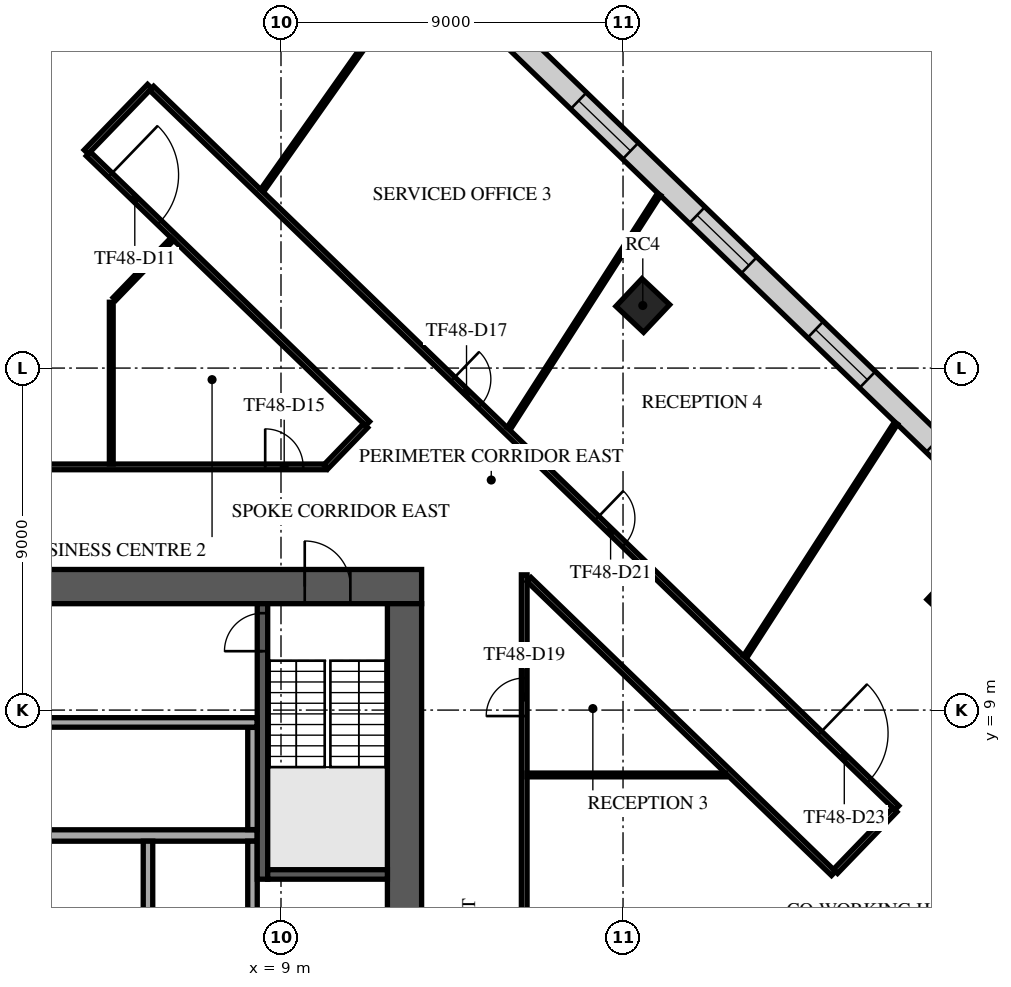
"""IFC4 building model, lengths in metres.
Left out: names, types, materials, properties, quantities, classifications, styles, units other than length and angle.
Written with IfcOpenShell. Run it as: python <this file> out.ifc"""

import sys

from ifc_helpers import new_model, si_unit, direction, frame, frame_2d, origin, origin_2d, place, context, subcontext, project, spatial, rectangle, extrude, element, fill, save


model = new_model("IFC4")
c1 = context("Model", 3, precision=1e-05, world=origin(), true_north=direction((0.0, 1.0)))
c2 = subcontext(c1, "Body", "Model", "MODEL_VIEW")
j1 = project(units=[si_unit("LENGTHUNIT", "METRE"), si_unit("PLANEANGLEUNIT", "RADIAN")], contexts=[c1])
p1 = place(None, origin())
s1 = spatial("IfcSite", under=j1, at=p1, CompositionType="ELEMENT")
p2 = place(p1, origin())
s2 = spatial("IfcBuilding", under=s1, at=p2, CompositionType="ELEMENT")
p3 = place(p2, frame((0.0, 0.0, 205.3)))
s3 = spatial("IfcBuildingStorey", under=s2, at=p3, CompositionType="ELEMENT", Elevation=205.3)
for number, where, z_axis, x_axis in (
    (1, (26.706, 11.931, 0.0), (0.0, 0.0, 1.0), (0.686, 0.728, 0.0)),
    (2, (18.52, 19.647, 0.0), (0.0, 0.0, 1.0), (0.686, 0.728, 0.0)),
):
    element("IfcColumn", number, at=place(p3, frame(where, z_axis=z_axis, x_axis=x_axis)), inside=s3, PredefinedType="COLUMN", context=c2, shape_type="SweptSolid", body=[
        extrude(rectangle(XDim=1.0, YDim=1.0, at=origin_2d()), origin(), (0.0, 0.0, 1.0), 4.0),
    ])
p4 = place(p3, frame((-12.7, 12.25, 0.0), z_axis=(0.0, 0.0, 1.0), x_axis=(1.0, 0.0, 0.0)))
e3 = element("IfcWall", 3, at=p4, inside=s3, PredefinedType="SHEAR", context=c2, shape_type="SweptSolid", body=[
    extrude(rectangle(XDim=25.4, YDim=0.9, at=frame_2d((12.7, 0.0))), origin(), (0.0, 0.0, 1.0), 3.62),
])
p5 = place(p4, frame((11.5, 0.0, 0.0)))
e4 = element("IfcOpeningElement", 4, at=p5, cuts=e3, PredefinedType="OPENING", context=c2, shape_type="SweptSolid", body=[
    extrude(rectangle(XDim=2.4, YDim=2.4, at=frame_2d((1.2, 1.2))), frame((0.0, 0.46, 0.0), z_axis=(0.0, -1.0, 0.0), x_axis=(1.0, 0.0, 0.0)), (0.0, 0.0, 1.0), 0.92),
])
p6 = place(p4, frame((22.325, 0.0, 0.0)))
e5 = element("IfcOpeningElement", 5, at=p6, cuts=e3, PredefinedType="OPENING", context=c2, shape_type="SweptSolid", body=[
    extrude(rectangle(XDim=1.2, YDim=2.1, at=frame_2d((0.6, 1.05))), frame((0.0, 0.46, 0.0), z_axis=(0.0, -1.0, 0.0), x_axis=(1.0, 0.0, 0.0)), (0.0, 0.0, 1.0), 0.92),
])
p7 = place(p4, frame((1.3, 0.0, 0.0)))
e6 = element("IfcOpeningElement", 6, at=p7, cuts=e3, PredefinedType="OPENING", context=c2, shape_type="SweptSolid", body=[
    extrude(rectangle(XDim=1.0, YDim=2.1, at=frame_2d((0.5, 1.05))), frame((0.0, 0.46, 0.0), z_axis=(0.0, -1.0, 0.0), x_axis=(1.0, 0.0, 0.0)), (0.0, 0.0, 1.0), 0.92),
])
p8 = place(p3, frame((12.25, -11.8, 0.0), z_axis=(0.0, 0.0, 1.0), x_axis=(0.0, 1.0, 0.0)))
e7 = element("IfcWall", 7, at=p8, inside=s3, PredefinedType="SHEAR", context=c2, shape_type="SweptSolid", body=[
    extrude(rectangle(XDim=23.6, YDim=0.9, at=frame_2d((11.8, 0.0))), origin(), (0.0, 0.0, 1.0), 3.62),
])
p9 = place(p8, frame((10.6, 0.0, 0.0)))
e8 = element("IfcOpeningElement", 8, at=p9, cuts=e7, PredefinedType="OPENING", context=c2, shape_type="SweptSolid", body=[
    extrude(rectangle(XDim=2.4, YDim=2.4, at=frame_2d((1.2, 1.2))), frame((0.0, 0.46, 0.0), z_axis=(0.0, -1.0, 0.0), x_axis=(1.0, 0.0, 0.0)), (0.0, 0.0, 1.0), 0.92),
])
p10 = place(p3, frame((-8.375, 5.7, 0.0), z_axis=(0.0, 0.0, 1.0), x_axis=(1.0, 0.0, 0.0)))
e9 = element("IfcWall", 9, at=p10, inside=s3, PredefinedType="SOLIDWALL", context=c2, shape_type="SweptSolid", body=[
    extrude(rectangle(XDim=16.75, YDim=0.3, at=frame_2d((8.375, 0.0))), origin(), (0.0, 0.0, 1.0), 3.62),
])
for number, where, z_axis, x_axis in (
    (10, (5.5, 2.85, 0.0), (0.0, 0.0, 1.0), (0.0, 1.0, 0.0)),
    (11, (8.25, 2.85, 0.0), (0.0, 0.0, 1.0), (0.0, 1.0, 0.0)),
):
    element("IfcWall", number, at=place(p3, frame(where, z_axis=z_axis, x_axis=x_axis)), inside=s3, PredefinedType="SOLIDWALL", context=c2, shape_type="SweptSolid", body=[
        extrude(rectangle(XDim=2.7, YDim=0.25, at=frame_2d((1.35, 0.0))), origin(), (0.0, 0.0, 1.0), 3.62),
    ])
p11 = place(p3, frame((8.512, 4.55, 0.0), z_axis=(0.0, 0.0, 1.0), x_axis=(0.0, 1.0, 0.0)))
e12 = element("IfcWall", 12, at=p11, inside=s3, PredefinedType="SOLIDWALL", context=c2, shape_type="SweptSolid", body=[
    extrude(rectangle(XDim=7.25, YDim=0.275, at=frame_2d((3.625, 0.0))), origin(), (0.0, 0.0, 1.0), 3.62),
])
p12 = place(p11, frame((6.0, 0.0, 0.0)))
e13 = element("IfcOpeningElement", 13, at=p12, cuts=e12, PredefinedType="OPENING", context=c2, shape_type="SweptSolid", body=[
    extrude(rectangle(XDim=1.0, YDim=2.1, at=frame_2d((0.5, 1.05))), frame((0.0, 0.147, 0.0), z_axis=(0.0, -1.0, 0.0), x_axis=(1.0, 0.0, 0.0)), (0.0, 0.0, 1.0), 0.295),
])
p13 = place(p3, frame((8.65, 4.675, 0.0), z_axis=(0.0, 0.0, 1.0), x_axis=(1.0, 0.0, 0.0)))
e14 = element("IfcWall", 14, at=p13, inside=s3, PredefinedType="SOLIDWALL", context=c2, shape_type="SweptSolid", body=[
    extrude(rectangle(XDim=3.15, YDim=0.25, at=frame_2d((1.575, 0.0))), origin(), (0.0, 0.0, 1.0), 3.62),
])
p14 = place(p3, frame((8.25, 5.855, 0.0), z_axis=(0.0, 0.0, 1.0), x_axis=(0.0, 1.0, 0.0)))
e15 = element("IfcWall", 15, at=p14, inside=s3, PredefinedType="PARTITIONING", context=c2, shape_type="SweptSolid", body=[
    extrude(rectangle(XDim=2.69, YDim=0.25, at=frame_2d((1.345, 0.0))), origin(), (0.0, 0.0, 1.0), 3.62),
])
p15 = place(p3, frame((-8.35, 8.675, 0.0), z_axis=(0.0, 0.0, 1.0), x_axis=(1.0, 0.0, 0.0)))
e16 = element("IfcWall", 16, at=p15, inside=s3, PredefinedType="PARTITIONING", context=c2, shape_type="SweptSolid", body=[
    extrude(rectangle(XDim=16.72, YDim=0.25, at=frame_2d((8.36, 0.0))), origin(), (0.0, 0.0, 1.0), 3.62),
])
p16 = place(p15, frame((0.975, 0.0, 0.0)))
e17 = element("IfcOpeningElement", 17, at=p16, cuts=e16, PredefinedType="OPENING", context=c2, shape_type="SweptSolid", body=[
    extrude(rectangle(XDim=1.0, YDim=2.1, at=frame_2d((0.5, 1.05))), frame((0.0, 0.135, 0.0), z_axis=(0.0, -1.0, 0.0), x_axis=(1.0, 0.0, 0.0)), (0.0, 0.0, 1.0), 0.27),
])
p17 = place(p15, frame((3.725, 0.0, 0.0)))
e18 = element("IfcOpeningElement", 18, at=p17, cuts=e16, PredefinedType="OPENING", context=c2, shape_type="SweptSolid", body=[
    extrude(rectangle(XDim=1.0, YDim=2.1, at=frame_2d((0.5, 1.05))), frame((0.0, 0.135, 0.0), z_axis=(0.0, -1.0, 0.0), x_axis=(1.0, 0.0, 0.0)), (0.0, 0.0, 1.0), 0.27),
])
p18 = place(p15, frame((9.125, 0.0, 0.0)))
e19 = element("IfcOpeningElement", 19, at=p18, cuts=e16, PredefinedType="OPENING", context=c2, shape_type="SweptSolid", body=[
    extrude(rectangle(XDim=1.2, YDim=2.1, at=frame_2d((0.6, 1.05))), frame((0.0, 0.135, 0.0), z_axis=(0.0, -1.0, 0.0), x_axis=(1.0, 0.0, 0.0)), (0.0, 0.0, 1.0), 0.27),
])
p19 = place(p3, frame((34.658, 7.819, 0.0), z_axis=(0.0, 0.0, 1.0), x_axis=(-0.719340729741, 0.694657408034, 0.0)))
e20 = element("IfcWall", 20, at=p19, inside=s3, PredefinedType="STANDARD", context=c2, shape_type="SweptSolid", body=[
    extrude(rectangle(XDim=39.0, YDim=0.6, at=frame_2d((19.5, 0.0))), origin(), (0.0, 0.0, 1.0), 3.62),
])
p20 = place(p19, frame((1.217, 0.0, 0.9)))
e21 = element("IfcOpeningElement", 21, at=p20, cuts=e20, PredefinedType="OPENING", context=c2, shape_type="SweptSolid", body=[
    extrude(rectangle(XDim=1.9, YDim=2.1, at=frame_2d((0.95, 1.05))), frame((0.0, 0.31, 0.0), z_axis=(0.0, -1.0, 0.0), x_axis=(1.0, 0.0, 0.0)), (0.0, 0.0, 1.0), 0.62),
])
p21 = place(p19, frame((5.55, 0.0, 0.9)))
e22 = element("IfcOpeningElement", 22, at=p21, cuts=e20, PredefinedType="OPENING", context=c2, shape_type="SweptSolid", body=[
    extrude(rectangle(XDim=1.9, YDim=2.1, at=frame_2d((0.95, 1.05))), frame((0.0, 0.31, 0.0), z_axis=(0.0, -1.0, 0.0), x_axis=(1.0, 0.0, 0.0)), (0.0, 0.0, 1.0), 0.62),
])
p22 = place(p19, frame((9.883, 0.0, 0.9)))
e23 = element("IfcOpeningElement", 23, at=p22, cuts=e20, PredefinedType="OPENING", context=c2, shape_type="SweptSolid", body=[
    extrude(rectangle(XDim=1.9, YDim=2.1, at=frame_2d((0.95, 1.05))), frame((0.0, 0.31, 0.0), z_axis=(0.0, -1.0, 0.0), x_axis=(1.0, 0.0, 0.0)), (0.0, 0.0, 1.0), 0.62),
])
p23 = place(p19, frame((14.217, 0.0, 0.9)))
e24 = element("IfcOpeningElement", 24, at=p23, cuts=e20, PredefinedType="OPENING", context=c2, shape_type="SweptSolid", body=[
    extrude(rectangle(XDim=1.9, YDim=2.1, at=frame_2d((0.95, 1.05))), frame((0.0, 0.31, 0.0), z_axis=(0.0, -1.0, 0.0), x_axis=(1.0, 0.0, 0.0)), (0.0, 0.0, 1.0), 0.62),
])
p24 = place(p19, frame((18.55, 0.0, 0.9)))
e25 = element("IfcOpeningElement", 25, at=p24, cuts=e20, PredefinedType="OPENING", context=c2, shape_type="SweptSolid", body=[
    extrude(rectangle(XDim=1.9, YDim=2.1, at=frame_2d((0.95, 1.05))), frame((0.0, 0.31, 0.0), z_axis=(0.0, -1.0, 0.0), x_axis=(1.0, 0.0, 0.0)), (0.0, 0.0, 1.0), 0.62),
])
p25 = place(p19, frame((22.883, 0.0, 0.9)))
e26 = element("IfcOpeningElement", 26, at=p25, cuts=e20, PredefinedType="OPENING", context=c2, shape_type="SweptSolid", body=[
    extrude(rectangle(XDim=1.9, YDim=2.1, at=frame_2d((0.95, 1.05))), frame((0.0, 0.31, 0.0), z_axis=(0.0, -1.0, 0.0), x_axis=(1.0, 0.0, 0.0)), (0.0, 0.0, 1.0), 0.62),
])
p26 = place(p19, frame((27.217, 0.0, 0.9)))
e27 = element("IfcOpeningElement", 27, at=p26, cuts=e20, PredefinedType="OPENING", context=c2, shape_type="SweptSolid", body=[
    extrude(rectangle(XDim=1.9, YDim=2.1, at=frame_2d((0.95, 1.05))), frame((0.0, 0.31, 0.0), z_axis=(0.0, -1.0, 0.0), x_axis=(1.0, 0.0, 0.0)), (0.0, 0.0, 1.0), 0.62),
])
p27 = place(p19, frame((31.55, 0.0, 0.9)))
e28 = element("IfcOpeningElement", 28, at=p27, cuts=e20, PredefinedType="OPENING", context=c2, shape_type="SweptSolid", body=[
    extrude(rectangle(XDim=1.9, YDim=2.1, at=frame_2d((0.95, 1.05))), frame((0.0, 0.31, 0.0), z_axis=(0.0, -1.0, 0.0), x_axis=(1.0, 0.0, 0.0)), (0.0, 0.0, 1.0), 0.62),
])
p28 = place(p19, frame((35.883, 0.0, 0.9)))
e29 = element("IfcOpeningElement", 29, at=p28, cuts=e20, PredefinedType="OPENING", context=c2, shape_type="SweptSolid", body=[
    extrude(rectangle(XDim=1.9, YDim=2.1, at=frame_2d((0.95, 1.05))), frame((0.0, 0.31, 0.0), z_axis=(0.0, -1.0, 0.0), x_axis=(1.0, 0.0, 0.0)), (0.0, 0.0, 1.0), 0.62),
])
p29 = place(p3, frame((-8.737, 15.4, 0.0), z_axis=(0.0, 0.0, 1.0), x_axis=(1.0, 0.0, 0.0)))
e30 = element("IfcWall", 30, at=p29, inside=s3, PredefinedType="PARTITIONING", context=c2, shape_type="SweptSolid", body=[
    extrude(rectangle(XDim=18.916, YDim=0.15, at=frame_2d((9.458, 0.0))), origin(), (0.0, 0.0, 1.0), 3.17),
])
p30 = place(p29, frame((17.321, 0.0, 0.0)))
e31 = element("IfcOpeningElement", 31, at=p30, cuts=e30, PredefinedType="OPENING", context=c2, shape_type="SweptSolid", body=[
    extrude(rectangle(XDim=1.0, YDim=2.1, at=frame_2d((0.5, 1.05))), frame((0.0, 0.085, 0.0), z_axis=(0.0, -1.0, 0.0), x_axis=(1.0, 0.0, 0.0)), (0.0, 0.0, 1.0), 0.17),
])
p31 = place(p3, frame((3.876, 23.688, 0.0), z_axis=(0.0, 0.0, 1.0), x_axis=(0.694688923552, 0.719310294305, 0.0)))
e32 = element("IfcWall", 32, at=p31, inside=s3, PredefinedType="PARTITIONING", context=c2, shape_type="SweptSolid", body=[
    extrude(rectangle(XDim=2.4, YDim=0.15, at=frame_2d((1.2, 0.0))), origin(), (0.0, 0.0, 1.0), 3.17),
])
p32 = place(p3, frame((3.93, 23.636, 0.0), z_axis=(0.0, 0.0, 1.0), x_axis=(0.719341752701, -0.694656348723, 0.0)))
e33 = element("IfcWall", 33, at=p32, inside=s3, PredefinedType="PARTITIONING", context=c2, shape_type="SweptSolid", body=[
    extrude(rectangle(XDim=10.217, YDim=0.15, at=frame_2d((5.108, 0.0))), origin(), (0.0, 0.0, 1.0), 3.17),
])
p33 = place(p32, frame((0.8, 0.0, 0.0)))
e34 = element("IfcOpeningElement", 34, at=p33, cuts=e33, PredefinedType="OPENING", context=c2, shape_type="SweptSolid", body=[
    extrude(rectangle(XDim=1.8, YDim=2.1, at=frame_2d((0.9, 1.05))), frame((0.0, 0.085, 0.0), z_axis=(0.0, -1.0, 0.0), x_axis=(1.0, 0.0, 0.0)), (0.0, 0.0, 1.0), 0.17),
])
p34 = place(p3, frame((5.597, 25.362, 0.0), z_axis=(0.0, 0.0, 1.0), x_axis=(0.719350067003, -0.69464773886, 0.0)))
e35 = element("IfcWall", 35, at=p34, inside=s3, PredefinedType="PARTITIONING", context=c2, shape_type="SweptSolid", body=[
    extrude(rectangle(XDim=27.258, YDim=0.15, at=frame_2d((13.629, 0.0))), origin(), (0.0, 0.0, 1.0), 3.17),
])
p35 = place(p34, frame((11.017, 0.0, 0.0)))
e36 = element("IfcOpeningElement", 36, at=p35, cuts=e35, PredefinedType="OPENING", context=c2, shape_type="SweptSolid", body=[
    extrude(rectangle(XDim=1.0, YDim=2.1, at=frame_2d((0.5, 1.05))), frame((0.0, 0.085, 0.0), z_axis=(0.0, -1.0, 0.0), x_axis=(1.0, 0.0, 0.0)), (0.0, 0.0, 1.0), 0.17),
])
p36 = place(p34, frame((16.287, 0.0, 0.0)))
e37 = element("IfcOpeningElement", 37, at=p36, cuts=e35, PredefinedType="OPENING", context=c2, shape_type="SweptSolid", body=[
    extrude(rectangle(XDim=1.0, YDim=2.1, at=frame_2d((0.5, 1.05))), frame((0.0, 0.085, 0.0), z_axis=(0.0, -1.0, 0.0), x_axis=(1.0, 0.0, 0.0)), (0.0, 0.0, 1.0), 0.17),
])
p37 = place(p34, frame((24.435, 0.0, 0.0)))
e38 = element("IfcOpeningElement", 38, at=p37, cuts=e35, PredefinedType="OPENING", context=c2, shape_type="SweptSolid", body=[
    extrude(rectangle(XDim=1.8, YDim=2.1, at=frame_2d((0.9, 1.05))), frame((0.0, 0.085, 0.0), z_axis=(0.0, -1.0, 0.0), x_axis=(1.0, 0.0, 0.0)), (0.0, 0.0, 1.0), 0.17),
])
p38 = place(p3, frame((10.18, 15.4, 0.0), z_axis=(0.0, 0.0, 1.0), x_axis=(0.694282379976, 0.719702700325, 0.0)))
e39 = element("IfcWall", 39, at=p38, inside=s3, PredefinedType="PARTITIONING", context=c2, shape_type="SweptSolid", body=[
    extrude(rectangle(XDim=1.508, YDim=0.15, at=frame_2d((0.754, 0.0))), origin(), (0.0, 0.0, 1.0), 3.17),
])
p39 = place(p3, frame((15.4, -8.314, 0.0), z_axis=(0.0, 0.0, 1.0), x_axis=(0.0, 1.0, 0.0)))
e40 = element("IfcWall", 40, at=p39, inside=s3, PredefinedType="PARTITIONING", context=c2, shape_type="SweptSolid", body=[
    extrude(rectangle(XDim=20.874, YDim=0.15, at=frame_2d((10.437, 0.0))), origin(), (0.0, 0.0, 1.0), 3.17),
])
p40 = place(p39, frame((17.158, 0.0, 0.0)))
e41 = element("IfcOpeningElement", 41, at=p40, cuts=e40, PredefinedType="OPENING", context=c2, shape_type="SweptSolid", body=[
    extrude(rectangle(XDim=1.0, YDim=2.1, at=frame_2d((0.5, 1.05))), frame((0.0, 0.085, 0.0), z_axis=(0.0, -1.0, 0.0), x_axis=(1.0, 0.0, 0.0)), (0.0, 0.0, 1.0), 0.17),
])
p41 = place(p3, frame((15.527, 12.436, 0.0), z_axis=(0.0, 0.0, 1.0), x_axis=(0.719374261493, -0.694622683118, 0.0)))
e42 = element("IfcWall", 42, at=p41, inside=s3, PredefinedType="PARTITIONING", context=c2, shape_type="SweptSolid", body=[
    extrude(rectangle(XDim=11.136, YDim=0.15, at=frame_2d((5.568, 0.0))), origin(), (0.0, 0.0, 1.0), 3.17),
])
p42 = place(p3, frame((23.59, 4.755, 0.0), z_axis=(0.0, 0.0, 1.0), x_axis=(0.694681664174, 0.719317305131, 0.0)))
e43 = element("IfcWall", 43, at=p42, inside=s3, PredefinedType="PARTITIONING", context=c2, shape_type="SweptSolid", body=[
    extrude(rectangle(XDim=2.25, YDim=0.15, at=frame_2d((1.125, 0.0))), origin(), (0.0, 0.0, 1.0), 3.62),
])
p43 = place(p3, frame((4.534, 15.475, 0.0), z_axis=(0.0, 0.0, 1.0), x_axis=(0.0, 1.0, 0.0)))
e44 = element("IfcWall", 44, at=p43, inside=s3, PredefinedType="PARTITIONING", context=c2, shape_type="SweptSolid", body=[
    extrude(rectangle(XDim=4.257, YDim=0.1, at=frame_2d((2.128, 0.0))), origin(), (0.0, 0.0, 1.0), 3.62),
])
p44 = place(p3, frame((4.62, 19.821, 0.0), z_axis=(0.0, 0.0, 1.0), x_axis=(0.694620384486, 0.719376481028, 0.0)))
e45 = element("IfcWall", 45, at=p44, inside=s3, PredefinedType="PARTITIONING", context=c2, shape_type="SweptSolid", body=[
    extrude(rectangle(XDim=2.189, YDim=0.1, at=frame_2d((1.095, 0.0))), origin(), (0.0, 0.0, 1.0), 3.17),
])
p45 = place(p3, frame((8.503, 22.67, 0.0), z_axis=(0.0, 0.0, 1.0), x_axis=(0.576640998349, 0.816997649338, 0.0)))
e46 = element("IfcWall", 46, at=p45, inside=s3, PredefinedType="PARTITIONING", context=c2, shape_type="SweptSolid", body=[
    extrude(rectangle(XDim=7.269, YDim=0.1, at=frame_2d((3.634, 0.0))), origin(), (0.0, 0.0, 1.0), 2.97),
])
p46 = place(p3, frame((14.992, 16.408, 0.0), z_axis=(0.0, 0.0, 1.0), x_axis=(0.54025368273, 0.841502203382, 0.0)))
e47 = element("IfcWall", 47, at=p46, inside=s3, PredefinedType="PARTITIONING", context=c2, shape_type="SweptSolid", body=[
    extrude(rectangle(XDim=7.323, YDim=0.1, at=frame_2d((3.662, 0.0))), origin(), (0.0, 0.0, 1.0), 2.97),
])
p47 = place(p3, frame((15.475, 7.293, 0.0), z_axis=(0.0, 0.0, 1.0), x_axis=(1.0, 0.0, 0.0)))
e48 = element("IfcWall", 48, at=p47, inside=s3, PredefinedType="PARTITIONING", context=c2, shape_type="SweptSolid", body=[
    extrude(rectangle(XDim=5.218, YDim=0.1, at=frame_2d((2.609, 0.0))), origin(), (0.0, 0.0, 1.0), 3.17),
])
p48 = place(p3, frame((21.213, 10.4, 0.0), z_axis=(0.0, 0.0, 1.0), x_axis=(0.542191446755, 0.840254982172, 0.0)))
e49 = element("IfcWall", 49, at=p48, inside=s3, PredefinedType="PARTITIONING", context=c2, shape_type="SweptSolid", body=[
    extrude(rectangle(XDim=7.319, YDim=0.1, at=frame_2d((3.66, 0.0))), origin(), (0.0, 0.0, 1.0), 2.97),
])
p49 = place(p6, origin())
e50 = element("IfcDoor", 50, at=p49, inside=s3, OperationType="SINGLE_SWING_LEFT", PredefinedType="DOOR", context=c2, shape_type="SweptSolid", body=[
    extrude(rectangle(XDim=1.2, YDim=2.1, at=frame_2d((0.6, 1.05))), frame((0.0, 0.025, 0.0), z_axis=(0.0, -1.0, 0.0), x_axis=(1.0, 0.0, 0.0)), (0.0, 0.0, 1.0), 0.05),
])
fill(e5, e50)
p50 = place(p12, origin())
e51 = element("IfcDoor", 51, at=p50, inside=s3, OperationType="SINGLE_SWING_LEFT", PredefinedType="DOOR", context=c2, shape_type="SweptSolid", body=[
    extrude(rectangle(XDim=1.0, YDim=2.1, at=frame_2d((0.5, 1.05))), frame((0.0, 0.025, 0.0), z_axis=(0.0, -1.0, 0.0), x_axis=(1.0, 0.0, 0.0)), (0.0, 0.0, 1.0), 0.05),
])
fill(e13, e51)
p51 = place(p23, origin())
e52 = element("IfcWindow", 52, at=p51, inside=s3, PartitioningType="SINGLE_PANEL", PredefinedType="WINDOW", context=c2, shape_type="SweptSolid", body=[
    extrude(rectangle(XDim=1.9, YDim=2.1, at=frame_2d((0.95, 1.05))), frame((0.0, 0.03, 0.0), z_axis=(0.0, -1.0, 0.0), x_axis=(1.0, 0.0, 0.0)), (0.0, 0.0, 1.0), 0.06),
])
fill(e24, e52)
p52 = place(p24, origin())
e53 = element("IfcWindow", 53, at=p52, inside=s3, PartitioningType="SINGLE_PANEL", PredefinedType="WINDOW", context=c2, shape_type="SweptSolid", body=[
    extrude(rectangle(XDim=1.9, YDim=2.1, at=frame_2d((0.95, 1.05))), frame((0.0, 0.03, 0.0), z_axis=(0.0, -1.0, 0.0), x_axis=(1.0, 0.0, 0.0)), (0.0, 0.0, 1.0), 0.06),
])
fill(e25, e53)
p53 = place(p25, origin())
e54 = element("IfcWindow", 54, at=p53, inside=s3, PartitioningType="SINGLE_PANEL", PredefinedType="WINDOW", context=c2, shape_type="SweptSolid", body=[
    extrude(rectangle(XDim=1.9, YDim=2.1, at=frame_2d((0.95, 1.05))), frame((0.0, 0.03, 0.0), z_axis=(0.0, -1.0, 0.0), x_axis=(1.0, 0.0, 0.0)), (0.0, 0.0, 1.0), 0.06),
])
fill(e26, e54)
p54 = place(p33, frame((1.8, 0.0, 0.0), z_axis=(0.0, 0.0, 1.0), x_axis=(-1.0, 0.0, 0.0)))
e55 = element("IfcDoor", 55, at=p54, inside=s3, OperationType="DOUBLE_DOOR_SINGLE_SWING", PredefinedType="DOOR", context=c2, shape_type="SweptSolid", body=[
    extrude(rectangle(XDim=1.8, YDim=2.1, at=frame_2d((0.9, 1.05))), frame((0.0, 0.025, 0.0), z_axis=(0.0, -1.0, 0.0), x_axis=(1.0, 0.0, 0.0)), (0.0, 0.0, 1.0), 0.05),
])
fill(e34, e55)
p55 = place(p30, origin())
e56 = element("IfcDoor", 56, at=p55, inside=s3, OperationType="SINGLE_SWING_LEFT", PredefinedType="DOOR", context=c2, shape_type="SweptSolid", body=[
    extrude(rectangle(XDim=1.0, YDim=2.1, at=frame_2d((0.5, 1.05))), frame((0.0, 0.025, 0.0), z_axis=(0.0, -1.0, 0.0), x_axis=(1.0, 0.0, 0.0)), (0.0, 0.0, 1.0), 0.05),
])
fill(e31, e56)
p56 = place(p35, origin())
e57 = element("IfcDoor", 57, at=p56, inside=s3, OperationType="SINGLE_SWING_LEFT", PredefinedType="DOOR", context=c2, shape_type="SweptSolid", body=[
    extrude(rectangle(XDim=1.0, YDim=2.1, at=frame_2d((0.5, 1.05))), frame((0.0, 0.025, 0.0), z_axis=(0.0, -1.0, 0.0), x_axis=(1.0, 0.0, 0.0)), (0.0, 0.0, 1.0), 0.05),
])
fill(e36, e57)
p57 = place(p40, frame((1.0, 0.0, 0.0), z_axis=(0.0, 0.0, 1.0), x_axis=(-1.0, 0.0, 0.0)))
e58 = element("IfcDoor", 58, at=p57, inside=s3, OperationType="SINGLE_SWING_RIGHT", PredefinedType="DOOR", context=c2, shape_type="SweptSolid", body=[
    extrude(rectangle(XDim=1.0, YDim=2.1, at=frame_2d((0.5, 1.05))), frame((0.0, 0.025, 0.0), z_axis=(0.0, -1.0, 0.0), x_axis=(1.0, 0.0, 0.0)), (0.0, 0.0, 1.0), 0.05),
])
fill(e41, e58)
p58 = place(p36, origin())
e59 = element("IfcDoor", 59, at=p58, inside=s3, OperationType="SINGLE_SWING_LEFT", PredefinedType="DOOR", context=c2, shape_type="SweptSolid", body=[
    extrude(rectangle(XDim=1.0, YDim=2.1, at=frame_2d((0.5, 1.05))), frame((0.0, 0.025, 0.0), z_axis=(0.0, -1.0, 0.0), x_axis=(1.0, 0.0, 0.0)), (0.0, 0.0, 1.0), 0.05),
])
fill(e37, e59)
p59 = place(p37, origin())
e60 = element("IfcDoor", 60, at=p59, inside=s3, OperationType="DOUBLE_DOOR_SINGLE_SWING", PredefinedType="DOOR", context=c2, shape_type="SweptSolid", body=[
    extrude(rectangle(XDim=1.8, YDim=2.1, at=frame_2d((0.9, 1.05))), frame((0.0, 0.025, 0.0), z_axis=(0.0, -1.0, 0.0), x_axis=(1.0, 0.0, 0.0)), (0.0, 0.0, 1.0), 0.05),
])
fill(e38, e60)
save(model, sys.argv[1])
